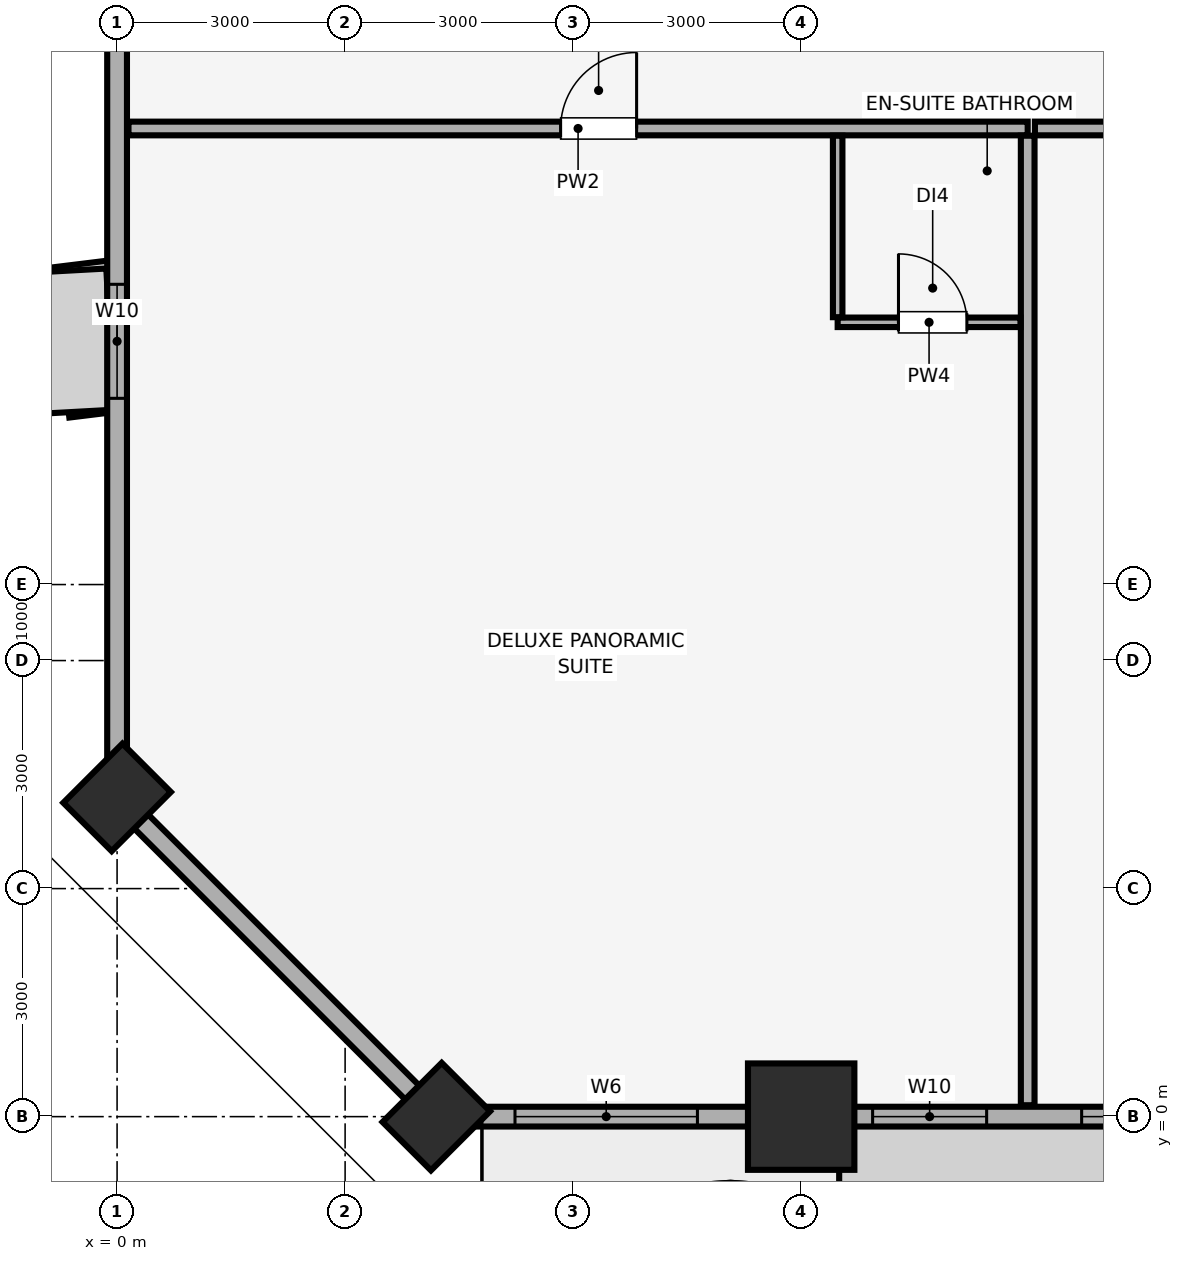
"""IFC4 building model, lengths in metres.
Left out: names, types, materials, properties, quantities, classifications, styles, units other than length and angle.
Written with IfcOpenShell. Run it as: python <this file> out.ifc"""

import sys

from ifc_helpers import new_model, si_unit, direction, frame, frame_2d, origin, origin_2d, place, context, subcontext, project, spatial, rectangle, extrude, element, fill, save


model = new_model("IFC4")
c1 = context("Model", 3, precision=1e-05, world=origin(), true_north=direction((0.0, 1.0)))
c2 = subcontext(c1, "Body", "Model", "MODEL_VIEW")
j1 = project(units=[si_unit("LENGTHUNIT", "METRE"), si_unit("PLANEANGLEUNIT", "RADIAN")], contexts=[c1])
p1 = place(None, origin())
s1 = spatial("IfcSite", under=j1, at=p1, CompositionType="ELEMENT")
p2 = place(p1, origin())
s2 = spatial("IfcBuilding", under=s1, at=p2, CompositionType="ELEMENT")
p3 = place(p2, frame((0.0, 0.0, 68.9)))
s3 = spatial("IfcBuildingStorey", under=s2, at=p3, CompositionType="ELEMENT", Elevation=68.9)
p4 = place(p3, frame((9.0, 0.0, 0.0), z_axis=(0.0, 0.0, 1.0), x_axis=(1.0, 0.0, 0.0)))
e1 = element("IfcColumn", 1, at=p4, inside=s3, PredefinedType="COLUMN", context=c2, shape_type="SweptSolid", body=[
    extrude(rectangle(XDim=1.4, YDim=1.4, at=origin_2d()), origin(), (0.0, 0.0, 1.0), 3.51),
])
for number, where, z_axis, x_axis in (
    (2, (4.2, 0.0, 0.0), (0.0, 0.0, 1.0), (0.707, 0.707, 0.0)),
    (3, (0.0, 4.2, 0.0), (0.0, 0.0, 1.0), (0.707, 0.707, 0.0)),
):
    element("IfcColumn", number, at=place(p3, frame(where, z_axis=z_axis, x_axis=x_axis)), inside=s3, PredefinedType="PILASTER", context=c2, shape_type="SweptSolid", body=[
        extrude(rectangle(XDim=1.1, YDim=0.9, at=origin_2d()), origin(), (0.0, 0.0, 1.0), 3.51),
    ])
p5 = place(p3, frame((4.2, 0.0, 0.0), z_axis=(0.0, 0.0, 1.0), x_axis=(1.0, 0.0, 0.0)))
e4 = element("IfcWall", 4, at=p5, inside=s3, PredefinedType="SOLIDWALL", context=c2, shape_type="SweptSolid", body=[
    extrude(rectangle(XDim=75.6, YDim=0.26, at=frame_2d((37.8, 0.0))), origin(), (0.0, 0.0, 1.0), 2.56),
])
p6 = place(p5, frame((13.517, 0.0, 0.0)))
e5 = element("IfcOpeningElement", 5, at=p6, cuts=e4, PredefinedType="OPENING", context=c2, shape_type="SweptSolid", body=[
    extrude(rectangle(XDim=1.1, YDim=2.15, at=frame_2d((0.55, 1.075))), frame((0.0, 0.14, 0.0), z_axis=(0.0, -1.0, 0.0), x_axis=(1.0, 0.0, 0.0)), (0.0, 0.0, 1.0), 0.28),
])
p7 = place(p5, frame((28.183, 0.0, 0.0)))
e6 = element("IfcOpeningElement", 6, at=p7, cuts=e4, PredefinedType="OPENING", context=c2, shape_type="SweptSolid", body=[
    extrude(rectangle(XDim=1.1, YDim=2.15, at=frame_2d((0.55, 1.075))), frame((0.0, 0.14, 0.0), z_axis=(0.0, -1.0, 0.0), x_axis=(1.0, 0.0, 0.0)), (0.0, 0.0, 1.0), 0.28),
])
p8 = place(p5, frame((58.094, 0.0, 0.0)))
e7 = element("IfcOpeningElement", 7, at=p8, cuts=e4, PredefinedType="OPENING", context=c2, shape_type="SweptSolid", body=[
    extrude(rectangle(XDim=1.1, YDim=2.15, at=frame_2d((0.55, 1.075))), frame((0.0, 0.14, 0.0), z_axis=(0.0, -1.0, 0.0), x_axis=(1.0, 0.0, 0.0)), (0.0, 0.0, 1.0), 0.28),
])
p9 = place(p5, frame((1.035, 0.0, 0.85)))
e8 = element("IfcOpeningElement", 8, at=p9, cuts=e4, PredefinedType="OPENING", context=c2, shape_type="SweptSolid", body=[
    extrude(rectangle(XDim=2.4, YDim=1.5, at=frame_2d((1.2, 0.75))), frame((0.0, 0.14, 0.0), z_axis=(0.0, -1.0, 0.0), x_axis=(1.0, 0.0, 0.0)), (0.0, 0.0, 1.0), 0.28),
])
p10 = place(p5, frame((5.74, 0.0, 0.85)))
e9 = element("IfcOpeningElement", 9, at=p10, cuts=e4, PredefinedType="OPENING", context=c2, shape_type="SweptSolid", body=[
    extrude(rectangle(XDim=1.5, YDim=1.4, at=frame_2d((0.75, 0.7))), frame((0.0, 0.14, 0.0), z_axis=(0.0, -1.0, 0.0), x_axis=(1.0, 0.0, 0.0)), (0.0, 0.0, 1.0), 0.28),
])
p11 = place(p5, frame((8.49, 0.0, 0.85)))
e10 = element("IfcOpeningElement", 10, at=p11, cuts=e4, PredefinedType="OPENING", context=c2, shape_type="SweptSolid", body=[
    extrude(rectangle(XDim=2.4, YDim=1.5, at=frame_2d((1.2, 0.75))), frame((0.0, 0.14, 0.0), z_axis=(0.0, -1.0, 0.0), x_axis=(1.0, 0.0, 0.0)), (0.0, 0.0, 1.0), 0.28),
])
p12 = place(p5, frame((15.855, 0.0, 0.85)))
e11 = element("IfcOpeningElement", 11, at=p12, cuts=e4, PredefinedType="OPENING", context=c2, shape_type="SweptSolid", body=[
    extrude(rectangle(XDim=2.4, YDim=1.5, at=frame_2d((1.2, 0.75))), frame((0.0, 0.14, 0.0), z_axis=(0.0, -1.0, 0.0), x_axis=(1.0, 0.0, 0.0)), (0.0, 0.0, 1.0), 0.28),
])
p13 = place(p5, frame((20.02, 0.0, 0.85)))
e12 = element("IfcOpeningElement", 12, at=p13, cuts=e4, PredefinedType="OPENING", context=c2, shape_type="SweptSolid", body=[
    extrude(rectangle(XDim=2.4, YDim=1.5, at=frame_2d((1.2, 0.75))), frame((0.0, 0.14, 0.0), z_axis=(0.0, -1.0, 0.0), x_axis=(1.0, 0.0, 0.0)), (0.0, 0.0, 1.0), 0.28),
])
p14 = place(p5, frame((23.67, 0.0, 0.85)))
e13 = element("IfcOpeningElement", 13, at=p14, cuts=e4, PredefinedType="OPENING", context=c2, shape_type="SweptSolid", body=[
    extrude(rectangle(XDim=1.5, YDim=1.4, at=frame_2d((0.75, 0.7))), frame((0.0, 0.14, 0.0), z_axis=(0.0, -1.0, 0.0), x_axis=(1.0, 0.0, 0.0)), (0.0, 0.0, 1.0), 0.28),
])
p15 = place(p5, frame((31.035, 0.0, 0.85)))
e14 = element("IfcOpeningElement", 14, at=p15, cuts=e4, PredefinedType="OPENING", context=c2, shape_type="SweptSolid", body=[
    extrude(rectangle(XDim=1.5, YDim=1.4, at=frame_2d((0.75, 0.7))), frame((0.0, 0.14, 0.0), z_axis=(0.0, -1.0, 0.0), x_axis=(1.0, 0.0, 0.0)), (0.0, 0.0, 1.0), 0.28),
])
p16 = place(p5, frame((34.75, 0.0, 0.85)))
e15 = element("IfcOpeningElement", 15, at=p16, cuts=e4, PredefinedType="OPENING", context=c2, shape_type="SweptSolid", body=[
    extrude(rectangle(XDim=2.4, YDim=1.5, at=frame_2d((1.2, 0.75))), frame((0.0, 0.14, 0.0), z_axis=(0.0, -1.0, 0.0), x_axis=(1.0, 0.0, 0.0)), (0.0, 0.0, 1.0), 0.28),
])
p17 = place(p5, frame((38.55, 0.0, 0.85)))
e16 = element("IfcOpeningElement", 16, at=p17, cuts=e4, PredefinedType="OPENING", context=c2, shape_type="SweptSolid", body=[
    extrude(rectangle(XDim=2.4, YDim=1.5, at=frame_2d((1.2, 0.75))), frame((0.0, 0.14, 0.0), z_axis=(0.0, -1.0, 0.0), x_axis=(1.0, 0.0, 0.0)), (0.0, 0.0, 1.0), 0.28),
])
p18 = place(p5, frame((43.165, 0.0, 0.85)))
e17 = element("IfcOpeningElement", 17, at=p18, cuts=e4, PredefinedType="OPENING", context=c2, shape_type="SweptSolid", body=[
    extrude(rectangle(XDim=1.5, YDim=1.4, at=frame_2d((0.75, 0.7))), frame((0.0, 0.14, 0.0), z_axis=(0.0, -1.0, 0.0), x_axis=(1.0, 0.0, 0.0)), (0.0, 0.0, 1.0), 0.28),
])
p19 = place(p5, frame((45.915, 0.0, 0.85)))
e18 = element("IfcOpeningElement", 18, at=p19, cuts=e4, PredefinedType="OPENING", context=c2, shape_type="SweptSolid", body=[
    extrude(rectangle(XDim=2.4, YDim=1.5, at=frame_2d((1.2, 0.75))), frame((0.0, 0.14, 0.0), z_axis=(0.0, -1.0, 0.0), x_axis=(1.0, 0.0, 0.0)), (0.0, 0.0, 1.0), 0.28),
])
p20 = place(p5, frame((50.081, 0.0, 0.85)))
e19 = element("IfcOpeningElement", 19, at=p20, cuts=e4, PredefinedType="OPENING", context=c2, shape_type="SweptSolid", body=[
    extrude(rectangle(XDim=2.4, YDim=1.5, at=frame_2d((1.2, 0.75))), frame((0.0, 0.14, 0.0), z_axis=(0.0, -1.0, 0.0), x_axis=(1.0, 0.0, 0.0)), (0.0, 0.0, 1.0), 0.28),
])
p21 = place(p5, frame((53.73, 0.0, 0.85)))
e20 = element("IfcOpeningElement", 20, at=p21, cuts=e4, PredefinedType="OPENING", context=c2, shape_type="SweptSolid", body=[
    extrude(rectangle(XDim=1.5, YDim=1.4, at=frame_2d((0.75, 0.7))), frame((0.0, 0.14, 0.0), z_axis=(0.0, -1.0, 0.0), x_axis=(1.0, 0.0, 0.0)), (0.0, 0.0, 1.0), 0.28),
])
p22 = place(p5, frame((61.095, 0.0, 0.85)))
e21 = element("IfcOpeningElement", 21, at=p22, cuts=e4, PredefinedType="OPENING", context=c2, shape_type="SweptSolid", body=[
    extrude(rectangle(XDim=1.5, YDim=1.4, at=frame_2d((0.75, 0.7))), frame((0.0, 0.14, 0.0), z_axis=(0.0, -1.0, 0.0), x_axis=(1.0, 0.0, 0.0)), (0.0, 0.0, 1.0), 0.28),
])
p23 = place(p5, frame((64.76, 0.0, 0.85)))
e22 = element("IfcOpeningElement", 22, at=p23, cuts=e4, PredefinedType="OPENING", context=c2, shape_type="SweptSolid", body=[
    extrude(rectangle(XDim=2.4, YDim=1.5, at=frame_2d((1.2, 0.75))), frame((0.0, 0.14, 0.0), z_axis=(0.0, -1.0, 0.0), x_axis=(1.0, 0.0, 0.0)), (0.0, 0.0, 1.0), 0.28),
])
p24 = place(p5, frame((68.41, 0.0, 0.85)))
e23 = element("IfcOpeningElement", 23, at=p24, cuts=e4, PredefinedType="OPENING", context=c2, shape_type="SweptSolid", body=[
    extrude(rectangle(XDim=1.5, YDim=1.4, at=frame_2d((0.75, 0.7))), frame((0.0, 0.14, 0.0), z_axis=(0.0, -1.0, 0.0), x_axis=(1.0, 0.0, 0.0)), (0.0, 0.0, 1.0), 0.28),
])
p25 = place(p5, frame((72.165, 0.0, 0.85)))
e24 = element("IfcOpeningElement", 24, at=p25, cuts=e4, PredefinedType="OPENING", context=c2, shape_type="SweptSolid", body=[
    extrude(rectangle(XDim=2.4, YDim=1.5, at=frame_2d((1.2, 0.75))), frame((0.0, 0.14, 0.0), z_axis=(0.0, -1.0, 0.0), x_axis=(1.0, 0.0, 0.0)), (0.0, 0.0, 1.0), 0.28),
])
p26 = place(p3, frame((0.0, 44.8, 0.0), z_axis=(0.0, 0.0, 1.0), x_axis=(0.0, -1.0, 0.0)))
e25 = element("IfcWall", 25, at=p26, inside=s3, PredefinedType="SOLIDWALL", context=c2, shape_type="SweptSolid", body=[
    extrude(rectangle(XDim=40.6, YDim=0.26, at=frame_2d((20.3, 0.0))), origin(), (0.0, 0.0, 1.0), 2.56),
])
p27 = place(p26, frame((33.85, 0.0, 0.85)))
e26 = element("IfcOpeningElement", 26, at=p27, cuts=e25, PredefinedType="OPENING", context=c2, shape_type="SweptSolid", body=[
    extrude(rectangle(XDim=1.5, YDim=1.4, at=frame_2d((0.75, 0.7))), frame((0.0, 0.14, 0.0), z_axis=(0.0, -1.0, 0.0), x_axis=(1.0, 0.0, 0.0)), (0.0, 0.0, 1.0), 0.28),
])
p28 = place(p26, frame((25.29, 0.0, 0.85)))
e27 = element("IfcOpeningElement", 27, at=p28, cuts=e25, PredefinedType="OPENING", context=c2, shape_type="SweptSolid", body=[
    extrude(rectangle(XDim=1.5, YDim=1.4, at=frame_2d((0.75, 0.7))), frame((0.0, 0.14, 0.0), z_axis=(0.0, -1.0, 0.0), x_axis=(1.0, 0.0, 0.0)), (0.0, 0.0, 1.0), 0.28),
])
p29 = place(p26, frame((18.49, 0.0, 0.85)))
e28 = element("IfcOpeningElement", 28, at=p29, cuts=e25, PredefinedType="OPENING", context=c2, shape_type="SweptSolid", body=[
    extrude(rectangle(XDim=1.5, YDim=1.4, at=frame_2d((0.75, 0.7))), frame((0.0, 0.14, 0.0), z_axis=(0.0, -1.0, 0.0), x_axis=(1.0, 0.0, 0.0)), (0.0, 0.0, 1.0), 0.28),
])
p30 = place(p26, frame((11.935, 0.0, 0.85)))
e29 = element("IfcOpeningElement", 29, at=p30, cuts=e25, PredefinedType="OPENING", context=c2, shape_type="SweptSolid", body=[
    extrude(rectangle(XDim=1.5, YDim=1.4, at=frame_2d((0.75, 0.7))), frame((0.0, 0.14, 0.0), z_axis=(0.0, -1.0, 0.0), x_axis=(1.0, 0.0, 0.0)), (0.0, 0.0, 1.0), 0.28),
])
p31 = place(p26, frame((7.165, 0.0, 0.85)))
e30 = element("IfcOpeningElement", 30, at=p31, cuts=e25, PredefinedType="OPENING", context=c2, shape_type="SweptSolid", body=[
    extrude(rectangle(XDim=1.5, YDim=1.4, at=frame_2d((0.75, 0.7))), frame((0.0, 0.14, 0.0), z_axis=(0.0, -1.0, 0.0), x_axis=(1.0, 0.0, 0.0)), (0.0, 0.0, 1.0), 0.28),
])
p32 = place(p26, frame((1.685, 0.0, 0.85)))
e31 = element("IfcOpeningElement", 31, at=p32, cuts=e25, PredefinedType="OPENING", context=c2, shape_type="SweptSolid", body=[
    extrude(rectangle(XDim=1.5, YDim=1.4, at=frame_2d((0.75, 0.7))), frame((0.0, 0.14, 0.0), z_axis=(0.0, -1.0, 0.0), x_axis=(1.0, 0.0, 0.0)), (0.0, 0.0, 1.0), 0.28),
])
p33 = place(p3, frame((0.0, 4.2, 0.0), z_axis=(0.0, 0.0, 1.0), x_axis=(0.707106781187, -0.707106781187, 0.0)))
e32 = element("IfcWall", 32, at=p33, inside=s3, PredefinedType="SOLIDWALL", context=c2, shape_type="SweptSolid", body=[
    extrude(rectangle(XDim=5.94, YDim=0.26, at=frame_2d((2.97, 0.0))), origin(), (0.0, 0.0, 1.0), 2.56),
])
p34 = place(p3, frame((0.15, 13.0, 0.0), z_axis=(0.0, 0.0, 1.0), x_axis=(1.0, 0.0, 0.0)))
e33 = element("IfcWall", 33, at=p34, inside=s3, PredefinedType="PARTITIONING", context=c2, shape_type="SweptSolid", body=[
    extrude(rectangle(XDim=11.83, YDim=0.18, at=frame_2d((5.915, 0.0))), origin(), (0.0, 0.0, 1.0), 3.51),
])
p35 = place(p34, frame((5.685, 0.0, 0.0)))
e34 = element("IfcOpeningElement", 34, at=p35, cuts=e33, PredefinedType="OPENING", context=c2, shape_type="SweptSolid", body=[
    extrude(rectangle(XDim=1.0, YDim=2.15, at=frame_2d((0.5, 1.075))), frame((0.0, 0.1, 0.0), z_axis=(0.0, -1.0, 0.0), x_axis=(1.0, 0.0, 0.0)), (0.0, 0.0, 1.0), 0.2),
])
p36 = place(p3, frame((11.98, 0.15, 0.0), z_axis=(0.0, 0.0, 1.0), x_axis=(0.0, 1.0, 0.0)))
e35 = element("IfcWall", 35, at=p36, inside=s3, PredefinedType="PARTITIONING", context=c2, shape_type="SweptSolid", body=[
    extrude(rectangle(XDim=12.755, YDim=0.18, at=frame_2d((6.377, 0.0))), origin(), (0.0, 0.0, 1.0), 3.51),
])
p37 = place(p3, frame((9.48, 10.45, 0.0), z_axis=(0.0, 0.0, 1.0), x_axis=(1.0, 0.0, 0.0)))
e36 = element("IfcWall", 36, at=p37, inside=s3, PredefinedType="PARTITIONING", context=c2, shape_type="SweptSolid", body=[
    extrude(rectangle(XDim=2.405, YDim=0.125, at=frame_2d((1.203, 0.0))), origin(), (0.0, 0.0, 1.0), 3.51),
])
p38 = place(p37, frame((0.8, 0.0, 0.0)))
e37 = element("IfcOpeningElement", 37, at=p38, cuts=e36, PredefinedType="OPENING", context=c2, shape_type="SweptSolid", body=[
    extrude(rectangle(XDim=0.9, YDim=2.1, at=frame_2d((0.45, 1.05))), frame((0.0, 0.073, 0.0), z_axis=(0.0, -1.0, 0.0), x_axis=(1.0, 0.0, 0.0)), (0.0, 0.0, 1.0), 0.145),
])
p39 = place(p3, frame((9.48, 10.518, 0.0), z_axis=(0.0, 0.0, 1.0), x_axis=(0.0, 1.0, 0.0)))
e38 = element("IfcWall", 38, at=p39, inside=s3, PredefinedType="PARTITIONING", context=c2, shape_type="SweptSolid", body=[
    extrude(rectangle(XDim=2.387, YDim=0.125, at=frame_2d((1.194, 0.0))), origin(), (0.0, 0.0, 1.0), 3.51),
])
p40 = place(p3, frame((12.075, 13.0, 0.0), z_axis=(0.0, 0.0, 1.0), x_axis=(1.0, 0.0, 0.0)))
e39 = element("IfcWall", 39, at=p40, inside=s3, PredefinedType="PARTITIONING", context=c2, shape_type="SweptSolid", body=[
    extrude(rectangle(XDim=7.435, YDim=0.18, at=frame_2d((3.718, 0.0))), origin(), (0.0, 0.0, 1.0), 3.51),
])
p41 = place(p40, frame((1.125, 0.0, 0.0)))
e40 = element("IfcOpeningElement", 40, at=p41, cuts=e39, PredefinedType="OPENING", context=c2, shape_type="SweptSolid", body=[
    extrude(rectangle(XDim=1.0, YDim=2.15, at=frame_2d((0.5, 1.075))), frame((0.0, 0.1, 0.0), z_axis=(0.0, -1.0, 0.0), x_axis=(1.0, 0.0, 0.0)), (0.0, 0.0, 1.0), 0.2),
])
p42 = place(p9, origin())
e41 = element("IfcWindow", 41, at=p42, inside=s3, PartitioningType="SINGLE_PANEL", PredefinedType="WINDOW", context=c2, shape_type="SweptSolid", body=[
    extrude(rectangle(XDim=2.4, YDim=1.5, at=frame_2d((1.2, 0.75))), frame((0.0, 0.03, 0.0), z_axis=(0.0, -1.0, 0.0), x_axis=(1.0, 0.0, 0.0)), (0.0, 0.0, 1.0), 0.06),
])
fill(e8, e41)
p43 = place(p10, origin())
e42 = element("IfcWindow", 42, at=p43, inside=s3, PartitioningType="SINGLE_PANEL", PredefinedType="WINDOW", context=c2, shape_type="SweptSolid", body=[
    extrude(rectangle(XDim=1.5, YDim=1.4, at=frame_2d((0.75, 0.7))), frame((0.0, 0.03, 0.0), z_axis=(0.0, -1.0, 0.0), x_axis=(1.0, 0.0, 0.0)), (0.0, 0.0, 1.0), 0.06),
])
fill(e9, e42)
p44 = place(p11, origin())
e43 = element("IfcWindow", 43, at=p44, inside=s3, PartitioningType="SINGLE_PANEL", PredefinedType="WINDOW", context=c2, shape_type="SweptSolid", body=[
    extrude(rectangle(XDim=2.4, YDim=1.5, at=frame_2d((1.2, 0.75))), frame((0.0, 0.03, 0.0), z_axis=(0.0, -1.0, 0.0), x_axis=(1.0, 0.0, 0.0)), (0.0, 0.0, 1.0), 0.06),
])
fill(e10, e43)
p45 = place(p27, origin())
e44 = element("IfcWindow", 44, at=p45, inside=s3, PartitioningType="SINGLE_PANEL", PredefinedType="WINDOW", context=c2, shape_type="SweptSolid", body=[
    extrude(rectangle(XDim=1.5, YDim=1.4, at=frame_2d((0.75, 0.7))), frame((0.0, 0.03, 0.0), z_axis=(0.0, -1.0, 0.0), x_axis=(1.0, 0.0, 0.0)), (0.0, 0.0, 1.0), 0.06),
])
fill(e26, e44)
p46 = place(p35, origin())
e45 = element("IfcDoor", 45, at=p46, inside=s3, OperationType="SINGLE_SWING_RIGHT", PredefinedType="DOOR", context=c2, shape_type="SweptSolid", body=[
    extrude(rectangle(XDim=1.0, YDim=2.15, at=frame_2d((0.5, 1.075))), frame((0.0, 0.025, 0.0), z_axis=(0.0, -1.0, 0.0), x_axis=(1.0, 0.0, 0.0)), (0.0, 0.0, 1.0), 0.05),
])
fill(e34, e45)
p47 = place(p38, origin())
e46 = element("IfcDoor", 46, at=p47, inside=s3, OperationType="SINGLE_SWING_LEFT", PredefinedType="DOOR", context=c2, shape_type="SweptSolid", body=[
    extrude(rectangle(XDim=0.9, YDim=2.1, at=frame_2d((0.45, 1.05))), frame((0.0, 0.025, 0.0), z_axis=(0.0, -1.0, 0.0), x_axis=(1.0, 0.0, 0.0)), (0.0, 0.0, 1.0), 0.05),
])
fill(e37, e46)
save(model, sys.argv[1])
